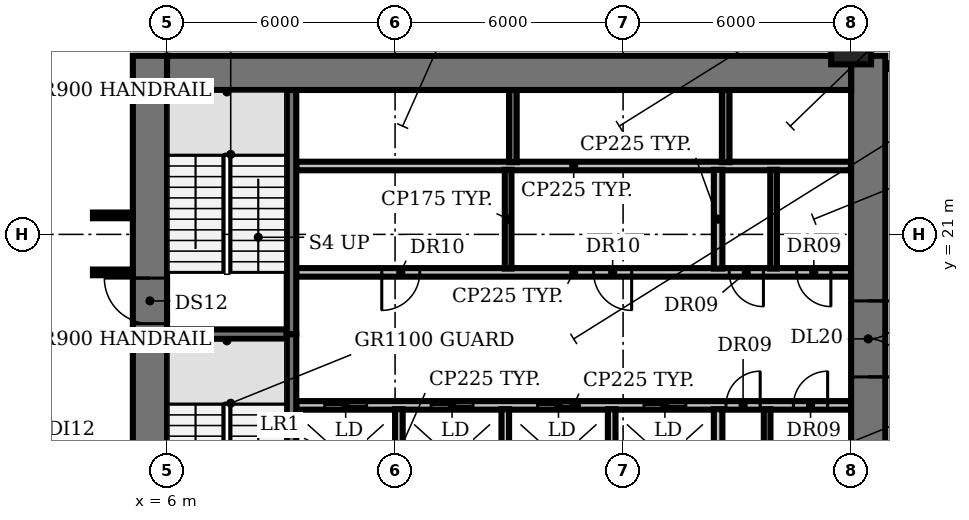
"""IFC4 building model, lengths in metres.
Left out: names, types, materials, properties, quantities, classifications, styles, units other than length and angle.
Written with IfcOpenShell. Run it as: python <this file> out.ifc"""

import sys

from ifc_helpers import new_model, si_unit, direction, frame, frame_2d, origin, origin_2d, place, context, subcontext, project, spatial, rectangle, circle, extrude, element, fill, save


model = new_model("IFC4")
c1 = context("Model", 3, precision=1e-05, world=origin(), true_north=direction((0.0, 1.0)))
c2 = subcontext(c1, "Body", "Model", "MODEL_VIEW")
j1 = project(units=[si_unit("LENGTHUNIT", "METRE"), si_unit("PLANEANGLEUNIT", "RADIAN")], contexts=[c1])
p1 = place(None, origin())
s1 = spatial("IfcSite", under=j1, at=p1, CompositionType="ELEMENT")
p2 = place(p1, origin())
s2 = spatial("IfcBuilding", under=s1, at=p2, CompositionType="ELEMENT")
p3 = place(p2, frame((0.0, 0.0, 37.4)))
s3 = spatial("IfcBuildingStorey", under=s2, at=p3, CompositionType="ELEMENT", Elevation=37.4)
p4 = place(p3, frame((24.0, 26.0, 0.0), z_axis=(0.0, 0.0, 1.0), x_axis=(1.0, 0.0, 0.0)))
e1 = element("IfcColumn", 1, at=p4, inside=s3, PredefinedType="COLUMN", context=c2, shape_type="SweptSolid", body=[
    extrude(circle(Radius=0.525, at=origin_2d()), origin(), (0.0, 0.0, 1.0), 3.85),
])
p5 = place(p3, frame((9.4, 16.5, 0.0), z_axis=(0.0, 0.0, 1.0), x_axis=(1.0, 0.0, 0.0)))
e2 = element("IfcWall", 2, at=p5, inside=s3, PredefinedType="PARTITIONING", context=c2, shape_type="SweptSolid", body=[
    extrude(rectangle(XDim=14.6, YDim=0.225, at=frame_2d((7.3, 0.0))), origin(), (0.0, 0.0, 1.0), 3.85),
])
p6 = place(p5, frame((0.75, 0.0, 0.0)))
e3 = element("IfcOpeningElement", 3, at=p6, cuts=e2, PredefinedType="OPENING", context=c2, shape_type="SweptSolid", body=[
    extrude(rectangle(XDim=1.1, YDim=2.1, at=frame_2d((0.55, 1.05))), frame((0.0, 0.123, 0.0), z_axis=(0.0, -1.0, 0.0), x_axis=(1.0, 0.0, 0.0)), (0.0, 0.0, 1.0), 0.245),
])
p7 = place(p5, frame((3.55, 0.0, 0.0)))
e4 = element("IfcOpeningElement", 4, at=p7, cuts=e2, PredefinedType="OPENING", context=c2, shape_type="SweptSolid", body=[
    extrude(rectangle(XDim=1.1, YDim=2.1, at=frame_2d((0.55, 1.05))), frame((0.0, 0.123, 0.0), z_axis=(0.0, -1.0, 0.0), x_axis=(1.0, 0.0, 0.0)), (0.0, 0.0, 1.0), 0.245),
])
p8 = place(p5, frame((6.35, 0.0, 0.0)))
e5 = element("IfcOpeningElement", 5, at=p8, cuts=e2, PredefinedType="OPENING", context=c2, shape_type="SweptSolid", body=[
    extrude(rectangle(XDim=1.1, YDim=2.1, at=frame_2d((0.55, 1.05))), frame((0.0, 0.123, 0.0), z_axis=(0.0, -1.0, 0.0), x_axis=(1.0, 0.0, 0.0)), (0.0, 0.0, 1.0), 0.245),
])
p9 = place(p5, frame((9.15, 0.0, 0.0)))
e6 = element("IfcOpeningElement", 6, at=p9, cuts=e2, PredefinedType="OPENING", context=c2, shape_type="SweptSolid", body=[
    extrude(rectangle(XDim=1.1, YDim=2.1, at=frame_2d((0.55, 1.05))), frame((0.0, 0.123, 0.0), z_axis=(0.0, -1.0, 0.0), x_axis=(1.0, 0.0, 0.0)), (0.0, 0.0, 1.0), 0.245),
])
p10 = place(p5, frame((11.308, 0.0, 0.0)))
e7 = element("IfcOpeningElement", 7, at=p10, cuts=e2, PredefinedType="OPENING", context=c2, shape_type="SweptSolid", body=[
    extrude(rectangle(XDim=0.9, YDim=2.1, at=frame_2d((0.45, 1.05))), frame((0.0, 0.123, 0.0), z_axis=(0.0, -1.0, 0.0), x_axis=(1.0, 0.0, 0.0)), (0.0, 0.0, 1.0), 0.245),
])
p11 = place(p5, frame((13.083, 0.0, 0.0)))
e8 = element("IfcOpeningElement", 8, at=p11, cuts=e2, PredefinedType="OPENING", context=c2, shape_type="SweptSolid", body=[
    extrude(rectangle(XDim=0.9, YDim=2.1, at=frame_2d((0.45, 1.05))), frame((0.0, 0.123, 0.0), z_axis=(0.0, -1.0, 0.0), x_axis=(1.0, 0.0, 0.0)), (0.0, 0.0, 1.0), 0.245),
])
p12 = place(p3, frame((6.0, 18.375, 0.0), z_axis=(0.0, 0.0, 1.0), x_axis=(1.0, 0.0, 0.0)))
e9 = element("IfcWall", 9, at=p12, inside=s3, PredefinedType="SHEAR", context=c2, shape_type="SweptSolid", body=[
    extrude(rectangle(XDim=3.15, YDim=0.25, at=frame_2d((1.575, 0.0))), origin(), (0.0, 0.0, 1.0), 3.85),
])
p13 = place(p3, frame((24.0, 20.0, 0.0), z_axis=(0.0, 0.0, 1.0), x_axis=(-1.0, 0.0, 0.0)))
e10 = element("IfcWall", 10, at=p13, inside=s3, PredefinedType="PARTITIONING", context=c2, shape_type="SweptSolid", body=[
    extrude(rectangle(XDim=14.6, YDim=0.225, at=frame_2d((7.3, 0.0))), origin(), (0.0, 0.0, 1.0), 3.85),
])
p14 = place(p13, frame((11.35, 0.0, 0.0)))
e11 = element("IfcOpeningElement", 11, at=p14, cuts=e10, PredefinedType="OPENING", context=c2, shape_type="SweptSolid", body=[
    extrude(rectangle(XDim=1.0, YDim=2.1, at=frame_2d((0.5, 1.05))), frame((0.0, 0.123, 0.0), z_axis=(0.0, -1.0, 0.0), x_axis=(1.0, 0.0, 0.0)), (0.0, 0.0, 1.0), 0.245),
])
p15 = place(p13, frame((5.775, 0.0, 0.0)))
e12 = element("IfcOpeningElement", 12, at=p15, cuts=e10, PredefinedType="OPENING", context=c2, shape_type="SweptSolid", body=[
    extrude(rectangle(XDim=1.0, YDim=2.1, at=frame_2d((0.5, 1.05))), frame((0.0, 0.123, 0.0), z_axis=(0.0, -1.0, 0.0), x_axis=(1.0, 0.0, 0.0)), (0.0, 0.0, 1.0), 0.245),
])
p16 = place(p13, frame((2.308, 0.0, 0.0)))
e13 = element("IfcOpeningElement", 13, at=p16, cuts=e10, PredefinedType="OPENING", context=c2, shape_type="SweptSolid", body=[
    extrude(rectangle(XDim=0.9, YDim=2.1, at=frame_2d((0.45, 1.05))), frame((0.0, 0.123, 0.0), z_axis=(0.0, -1.0, 0.0), x_axis=(1.0, 0.0, 0.0)), (0.0, 0.0, 1.0), 0.245),
])
p17 = place(p13, frame((0.532, 0.0, 0.0)))
e14 = element("IfcOpeningElement", 14, at=p17, cuts=e10, PredefinedType="OPENING", context=c2, shape_type="SweptSolid", body=[
    extrude(rectangle(XDim=0.9, YDim=2.1, at=frame_2d((0.45, 1.05))), frame((0.0, 0.123, 0.0), z_axis=(0.0, -1.0, 0.0), x_axis=(1.0, 0.0, 0.0)), (0.0, 0.0, 1.0), 0.245),
])
p18 = place(p3, frame((9.4, 22.8, 0.0), z_axis=(0.0, 0.0, 1.0), x_axis=(1.0, 0.0, 0.0)))
e15 = element("IfcWall", 15, at=p18, inside=s3, PredefinedType="PARTITIONING", context=c2, shape_type="SweptSolid", body=[
    extrude(rectangle(XDim=14.6, YDim=0.225, at=frame_2d((7.3, 0.0))), origin(), (0.0, 0.0, 1.0), 3.85),
])
p19 = place(p3, frame((9.275, 18.375, 0.0), z_axis=(0.0, 0.0, 1.0), x_axis=(0.0, -1.0, 0.0)))
e16 = element("IfcWall", 16, at=p19, inside=s3, PredefinedType="SHEAR", context=c2, shape_type="SweptSolid", body=[
    extrude(rectangle(XDim=6.55, YDim=0.25, at=frame_2d((3.275, 0.0))), origin(), (0.0, 0.0, 1.0), 3.85),
])
p20 = place(p19, frame((5.075, 0.0, 0.0)))
e17 = element("IfcOpeningElement", 17, at=p20, cuts=e16, PredefinedType="OPENING", context=c2, shape_type="SweptSolid", body=[
    extrude(rectangle(XDim=1.0, YDim=2.1, at=frame_2d((0.5, 1.05))), frame((0.0, 0.135, 0.0), z_axis=(0.0, -1.0, 0.0), x_axis=(1.0, 0.0, 0.0)), (0.0, 0.0, 1.0), 0.27),
])
p21 = place(p3, frame((9.275, 18.375, 0.0), z_axis=(0.0, 0.0, 1.0), x_axis=(0.0, 1.0, 0.0)))
e18 = element("IfcWall", 18, at=p21, inside=s3, PredefinedType="SHEAR", context=c2, shape_type="SweptSolid", body=[
    extrude(rectangle(XDim=6.425, YDim=0.25, at=frame_2d((3.212, 0.0))), origin(), (0.0, 0.0, 1.0), 3.85),
])
for number, where, z_axis, x_axis in (
    (19, (12.1, 13.8, 0.0), (0.0, 0.0, 1.0), (0.0, 1.0, 0.0)),
    (20, (14.9, 13.8, 0.0), (0.0, 0.0, 1.0), (0.0, 1.0, 0.0)),
):
    element("IfcWall", number, at=place(p3, frame(where, z_axis=z_axis, x_axis=x_axis)), inside=s3, PredefinedType="SOLIDWALL", context=c2, shape_type="SweptSolid", body=[
        extrude(rectangle(XDim=2.6, YDim=0.2, at=frame_2d((1.3, 0.0))), origin(), (0.0, 0.0, 1.0), 3.85),
    ])
p22 = place(p3, frame((14.975, 20.1, 0.0), z_axis=(0.0, 0.0, 1.0), x_axis=(0.0, 1.0, 0.0)))
e21 = element("IfcWall", 21, at=p22, inside=s3, PredefinedType="PARTITIONING", context=c2, shape_type="SweptSolid", body=[
    extrude(rectangle(XDim=2.6, YDim=0.175, at=frame_2d((1.3, 0.0))), origin(), (0.0, 0.0, 1.0), 3.85),
])
p23 = place(p3, frame((15.1, 22.9, 0.0), z_axis=(0.0, 0.0, 1.0), x_axis=(0.0, 1.0, 0.0)))
e22 = element("IfcWall", 22, at=p23, inside=s3, PredefinedType="SHEAR", context=c2, shape_type="SweptSolid", body=[
    extrude(rectangle(XDim=1.9, YDim=0.2, at=frame_2d((0.95, 0.0))), origin(), (0.0, 0.0, 1.0), 3.85),
])
p24 = place(p3, frame((17.7, 13.8, 0.0), z_axis=(0.0, 0.0, 1.0), x_axis=(0.0, 1.0, 0.0)))
e23 = element("IfcWall", 23, at=p24, inside=s3, PredefinedType="SOLIDWALL", context=c2, shape_type="SweptSolid", body=[
    extrude(rectangle(XDim=2.6, YDim=0.2, at=frame_2d((1.3, 0.0))), origin(), (0.0, 0.0, 1.0), 3.85),
])
for number, where, z_axis, x_axis in (
    (24, (20.5, 13.8, 0.0), (0.0, 0.0, 1.0), (0.0, 1.0, 0.0)),
    (25, (20.5, 20.1, 0.0), (0.0, 0.0, 1.0), (0.0, 1.0, 0.0)),
):
    element("IfcWall", number, at=place(p3, frame(where, z_axis=z_axis, x_axis=x_axis)), inside=s3, PredefinedType="PARTITIONING", context=c2, shape_type="SweptSolid", body=[
        extrude(rectangle(XDim=2.6, YDim=0.225, at=frame_2d((1.3, 0.0))), origin(), (0.0, 0.0, 1.0), 3.85),
    ])
p25 = place(p3, frame((20.7, 22.9, 0.0), z_axis=(0.0, 0.0, 1.0), x_axis=(0.0, 1.0, 0.0)))
e26 = element("IfcWall", 26, at=p25, inside=s3, PredefinedType="SHEAR", context=c2, shape_type="SweptSolid", body=[
    extrude(rectangle(XDim=1.9, YDim=0.2, at=frame_2d((0.95, 0.0))), origin(), (0.0, 0.0, 1.0), 3.85),
])
for number, where, z_axis, x_axis in (
    (27, (21.79, 13.8, 0.0), (0.0, 0.0, 1.0), (0.0, 1.0, 0.0)),
    (28, (21.96, 20.1, 0.0), (0.0, 0.0, 1.0), (0.0, 1.0, 0.0)),
):
    element("IfcWall", number, at=place(p3, frame(where, z_axis=z_axis, x_axis=x_axis)), inside=s3, PredefinedType="PARTITIONING", context=c2, shape_type="SweptSolid", body=[
        extrude(rectangle(XDim=2.6, YDim=0.175, at=frame_2d((1.3, 0.0))), origin(), (0.0, 0.0, 1.0), 3.85),
    ])
p26 = place(p3, frame((5.55, 4.5, 0.0), z_axis=(0.0, 0.0, 1.0), x_axis=(0.0, 1.0, 0.0)))
e29 = element("IfcWall", 29, at=p26, inside=s3, PredefinedType="SHEAR", context=c2, shape_type="SweptSolid", body=[
    extrude(rectangle(XDim=21.2, YDim=0.9, at=frame_2d((10.6, 0.0))), origin(), (0.0, 0.0, 1.0), 3.85),
])
p27 = place(p26, frame((1.15, 0.0, 0.0)))
e30 = element("IfcOpeningElement", 30, at=p27, cuts=e29, PredefinedType="OPENING", context=c2, shape_type="SweptSolid", body=[
    extrude(rectangle(XDim=1.5, YDim=2.1, at=frame_2d((0.75, 1.05))), frame((0.0, 0.46, 0.0), z_axis=(0.0, -1.0, 0.0), x_axis=(1.0, 0.0, 0.0)), (0.0, 0.0, 1.0), 0.92),
])
p28 = place(p26, frame((7.6, 0.0, 0.0)))
e31 = element("IfcOpeningElement", 31, at=p28, cuts=e29, PredefinedType="OPENING", context=c2, shape_type="SweptSolid", body=[
    extrude(rectangle(XDim=1.2, YDim=2.1, at=frame_2d((0.6, 1.05))), frame((0.0, 0.46, 0.0), z_axis=(0.0, -1.0, 0.0), x_axis=(1.0, 0.0, 0.0)), (0.0, 0.0, 1.0), 0.92),
])
p29 = place(p26, frame((14.15, 0.0, 0.0)))
e32 = element("IfcOpeningElement", 32, at=p29, cuts=e29, PredefinedType="OPENING", context=c2, shape_type="SweptSolid", body=[
    extrude(rectangle(XDim=1.2, YDim=2.1, at=frame_2d((0.6, 1.05))), frame((0.0, 0.46, 0.0), z_axis=(0.0, -1.0, 0.0), x_axis=(1.0, 0.0, 0.0)), (0.0, 0.0, 1.0), 0.92),
])
p30 = place(p3, frame((24.45, 25.7, 0.0), z_axis=(0.0, 0.0, 1.0), x_axis=(0.0, -1.0, 0.0)))
e33 = element("IfcWall", 33, at=p30, inside=s3, PredefinedType="SHEAR", context=c2, shape_type="SweptSolid", body=[
    extrude(rectangle(XDim=21.2, YDim=0.9, at=frame_2d((10.6, 0.0))), origin(), (0.0, 0.0, 1.0), 3.85),
])
p31 = place(p30, frame((18.55, 0.0, 0.0)))
e34 = element("IfcOpeningElement", 34, at=p31, cuts=e33, PredefinedType="OPENING", context=c2, shape_type="SweptSolid", body=[
    extrude(rectangle(XDim=1.5, YDim=2.1, at=frame_2d((0.75, 1.05))), frame((0.0, 0.46, 0.0), z_axis=(0.0, -1.0, 0.0), x_axis=(1.0, 0.0, 0.0)), (0.0, 0.0, 1.0), 0.92),
])
p32 = place(p30, frame((12.45, 0.0, 0.0)))
e35 = element("IfcOpeningElement", 35, at=p32, cuts=e33, PredefinedType="OPENING", context=c2, shape_type="SweptSolid", body=[
    extrude(rectangle(XDim=0.9, YDim=2.1, at=frame_2d((0.45, 1.05))), frame((0.0, 0.46, 0.0), z_axis=(0.0, -1.0, 0.0), x_axis=(1.0, 0.0, 0.0)), (0.0, 0.0, 1.0), 0.92),
])
p33 = place(p30, frame((6.45, 0.0, 0.0)))
e36 = element("IfcOpeningElement", 36, at=p33, cuts=e33, PredefinedType="OPENING", context=c2, shape_type="SweptSolid", body=[
    extrude(rectangle(XDim=2.0, YDim=2.1, at=frame_2d((1.0, 1.05))), frame((0.0, 0.46, 0.0), z_axis=(0.0, -1.0, 0.0), x_axis=(1.0, 0.0, 0.0)), (0.0, 0.0, 1.0), 0.92),
])
p34 = place(p3, frame((6.0, 25.25, 0.0), z_axis=(0.0, 0.0, 1.0), x_axis=(1.0, 0.0, 0.0)))
e37 = element("IfcWall", 37, at=p34, inside=s3, PredefinedType="SHEAR", context=c2, shape_type="SweptSolid", body=[
    extrude(rectangle(XDim=18.0, YDim=0.9, at=frame_2d((9.0, 0.0))), origin(), (0.0, 0.0, 1.0), 3.85),
])
for number, where, z_axis, x_axis in (
    (38, (4.05, 20.0, 0.0), (0.0, 0.0, 1.0), (1.0, 0.0, 0.0)),
    (39, (4.05, 21.5, 0.0), (0.0, 0.0, 1.0), (1.0, 0.0, 0.0)),
):
    element("IfcWall", number, at=place(p3, frame(where, z_axis=z_axis, x_axis=x_axis)), inside=s3, PredefinedType="PARTITIONING", context=c2, shape_type="SweptSolid", body=[
        extrude(rectangle(XDim=1.05, YDim=0.15, at=frame_2d((0.525, 0.0))), origin(), (0.0, 0.0, 1.0), 2.83),
    ])
p35 = place(p3, frame((25.0, 25.43, 0.0), z_axis=(0.0, 0.0, 1.0), x_axis=(1.0, 0.0, 0.0)))
e40 = element("IfcWall", 40, at=p35, inside=s3, PredefinedType="PARTITIONING", context=c2, shape_type="SweptSolid", body=[
    extrude(rectangle(XDim=1.14, YDim=0.15, at=frame_2d((0.57, 0.0))), origin(), (0.0, 0.0, 1.0), 2.83),
])
p36 = place(p6, origin())
e41 = element("IfcDoor", 41, at=p36, inside=s3, OperationType="DOUBLE_DOOR_SLIDING", PredefinedType="DOOR", context=c2, shape_type="SweptSolid", body=[
    extrude(rectangle(XDim=1.1, YDim=2.1, at=frame_2d((0.55, 1.05))), frame((0.0, 0.025, 0.0), z_axis=(0.0, -1.0, 0.0), x_axis=(1.0, 0.0, 0.0)), (0.0, 0.0, 1.0), 0.05),
])
fill(e3, e41)
p37 = place(p7, origin())
e42 = element("IfcDoor", 42, at=p37, inside=s3, OperationType="DOUBLE_DOOR_SLIDING", PredefinedType="DOOR", context=c2, shape_type="SweptSolid", body=[
    extrude(rectangle(XDim=1.1, YDim=2.1, at=frame_2d((0.55, 1.05))), frame((0.0, 0.025, 0.0), z_axis=(0.0, -1.0, 0.0), x_axis=(1.0, 0.0, 0.0)), (0.0, 0.0, 1.0), 0.05),
])
fill(e4, e42)
p38 = place(p8, origin())
e43 = element("IfcDoor", 43, at=p38, inside=s3, OperationType="DOUBLE_DOOR_SLIDING", PredefinedType="DOOR", context=c2, shape_type="SweptSolid", body=[
    extrude(rectangle(XDim=1.1, YDim=2.1, at=frame_2d((0.55, 1.05))), frame((0.0, 0.025, 0.0), z_axis=(0.0, -1.0, 0.0), x_axis=(1.0, 0.0, 0.0)), (0.0, 0.0, 1.0), 0.05),
])
fill(e5, e43)
p39 = place(p9, origin())
e44 = element("IfcDoor", 44, at=p39, inside=s3, OperationType="DOUBLE_DOOR_SLIDING", PredefinedType="DOOR", context=c2, shape_type="SweptSolid", body=[
    extrude(rectangle(XDim=1.1, YDim=2.1, at=frame_2d((0.55, 1.05))), frame((0.0, 0.025, 0.0), z_axis=(0.0, -1.0, 0.0), x_axis=(1.0, 0.0, 0.0)), (0.0, 0.0, 1.0), 0.05),
])
fill(e6, e44)
p40 = place(p10, origin())
e45 = element("IfcDoor", 45, at=p40, inside=s3, OperationType="SINGLE_SWING_RIGHT", PredefinedType="DOOR", context=c2, shape_type="SweptSolid", body=[
    extrude(rectangle(XDim=0.9, YDim=2.1, at=frame_2d((0.45, 1.05))), frame((0.0, 0.025, 0.0), z_axis=(0.0, -1.0, 0.0), x_axis=(1.0, 0.0, 0.0)), (0.0, 0.0, 1.0), 0.05),
])
fill(e7, e45)
p41 = place(p11, origin())
e46 = element("IfcDoor", 46, at=p41, inside=s3, OperationType="SINGLE_SWING_RIGHT", PredefinedType="DOOR", context=c2, shape_type="SweptSolid", body=[
    extrude(rectangle(XDim=0.9, YDim=2.1, at=frame_2d((0.45, 1.05))), frame((0.0, 0.025, 0.0), z_axis=(0.0, -1.0, 0.0), x_axis=(1.0, 0.0, 0.0)), (0.0, 0.0, 1.0), 0.05),
])
fill(e8, e46)
p42 = place(p14, origin())
e47 = element("IfcDoor", 47, at=p42, inside=s3, OperationType="SINGLE_SWING_RIGHT", PredefinedType="DOOR", context=c2, shape_type="SweptSolid", body=[
    extrude(rectangle(XDim=1.0, YDim=2.1, at=frame_2d((0.5, 1.05))), frame((0.0, 0.025, 0.0), z_axis=(0.0, -1.0, 0.0), x_axis=(1.0, 0.0, 0.0)), (0.0, 0.0, 1.0), 0.05),
])
fill(e11, e47)
p43 = place(p15, origin())
e48 = element("IfcDoor", 48, at=p43, inside=s3, OperationType="SINGLE_SWING_LEFT", PredefinedType="DOOR", context=c2, shape_type="SweptSolid", body=[
    extrude(rectangle(XDim=1.0, YDim=2.1, at=frame_2d((0.5, 1.05))), frame((0.0, 0.025, 0.0), z_axis=(0.0, -1.0, 0.0), x_axis=(1.0, 0.0, 0.0)), (0.0, 0.0, 1.0), 0.05),
])
fill(e12, e48)
p44 = place(p16, origin())
e49 = element("IfcDoor", 49, at=p44, inside=s3, OperationType="SINGLE_SWING_LEFT", PredefinedType="DOOR", context=c2, shape_type="SweptSolid", body=[
    extrude(rectangle(XDim=0.9, YDim=2.1, at=frame_2d((0.45, 1.05))), frame((0.0, 0.025, 0.0), z_axis=(0.0, -1.0, 0.0), x_axis=(1.0, 0.0, 0.0)), (0.0, 0.0, 1.0), 0.05),
])
fill(e13, e49)
p45 = place(p17, origin())
e50 = element("IfcDoor", 50, at=p45, inside=s3, OperationType="SINGLE_SWING_LEFT", PredefinedType="DOOR", context=c2, shape_type="SweptSolid", body=[
    extrude(rectangle(XDim=0.9, YDim=2.1, at=frame_2d((0.45, 1.05))), frame((0.0, 0.025, 0.0), z_axis=(0.0, -1.0, 0.0), x_axis=(1.0, 0.0, 0.0)), (0.0, 0.0, 1.0), 0.05),
])
fill(e14, e50)
p46 = place(p29, origin())
e51 = element("IfcDoor", 51, at=p46, inside=s3, OperationType="SINGLE_SWING_RIGHT", PredefinedType="DOOR", context=c2, shape_type="SweptSolid", body=[
    extrude(rectangle(XDim=1.2, YDim=2.1, at=frame_2d((0.6, 1.05))), frame((0.0, 0.025, 0.0), z_axis=(0.0, -1.0, 0.0), x_axis=(1.0, 0.0, 0.0)), (0.0, 0.0, 1.0), 0.05),
])
fill(e32, e51)
p47 = place(p33, origin())
e52 = element("IfcDoor", 52, at=p47, inside=s3, OperationType="DOUBLE_DOOR_SINGLE_SWING", PredefinedType="DOOR", context=c2, shape_type="SweptSolid", body=[
    extrude(rectangle(XDim=2.0, YDim=2.1, at=frame_2d((1.0, 1.05))), frame((0.0, 0.025, 0.0), z_axis=(0.0, -1.0, 0.0), x_axis=(1.0, 0.0, 0.0)), (0.0, 0.0, 1.0), 0.05),
])
fill(e36, e52)
save(model, sys.argv[1])
